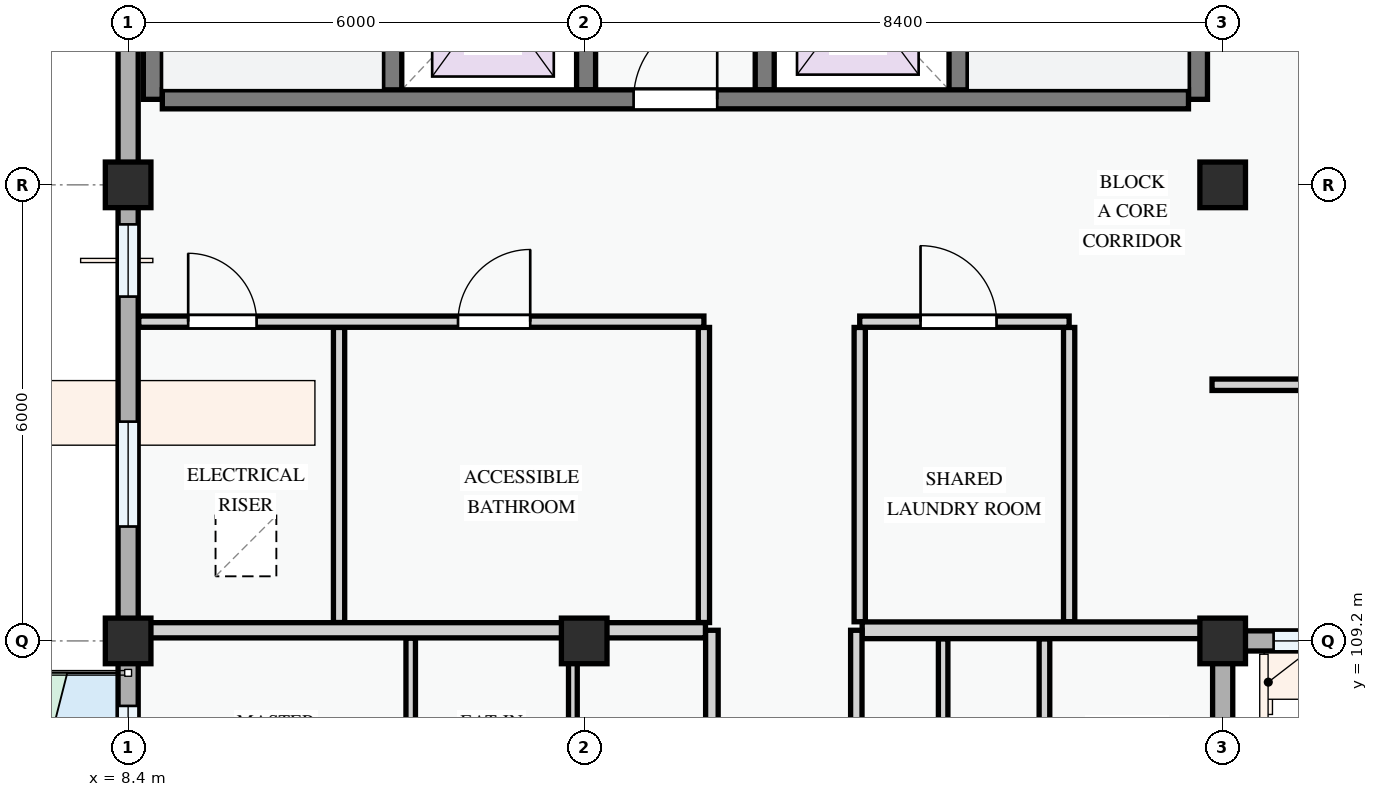
"""IFC4 building model, lengths in metres.
Left out: names, types, materials, properties, quantities, classifications, styles, units other than length and angle.
Written with IfcOpenShell. Run it as: python <this file> out.ifc"""

import sys

from ifc_helpers import new_model, si_unit, direction, frame, frame_2d, origin, origin_2d, place, context, subcontext, project, spatial, rectangle, extrude, element, fill, save


model = new_model("IFC4")
c1 = context("Model", 3, precision=1e-05, world=origin(), true_north=direction((0.0, 1.0)))
c2 = subcontext(c1, "Body", "Model", "MODEL_VIEW")
j1 = project(units=[si_unit("LENGTHUNIT", "METRE"), si_unit("PLANEANGLEUNIT", "RADIAN")], contexts=[c1])
p1 = place(None, origin())
s1 = spatial("IfcSite", under=j1, at=p1, CompositionType="ELEMENT")
p2 = place(p1, origin())
s2 = spatial("IfcBuilding", under=s1, at=p2, CompositionType="ELEMENT")
p3 = place(p2, frame((0.0, 0.0, 34.5)))
s3 = spatial("IfcBuildingStorey", under=s2, at=p3, CompositionType="ELEMENT", Elevation=34.5)
for number, where, z_axis, x_axis in (
    (1, (8.4, 109.2, 0.0), (0.0, 0.0, 1.0), (1.0, 0.0, 0.0)),
    (2, (8.4, 115.2, 0.0), (0.0, 0.0, 1.0), (1.0, 0.0, 0.0)),
    (3, (14.4, 109.2, 0.0), (0.0, 0.0, 1.0), (1.0, 0.0, 0.0)),
    (4, (22.8, 109.2, 0.0), (0.0, 0.0, 1.0), (1.0, 0.0, 0.0)),
    (5, (22.8, 115.2, 0.0), (0.0, 0.0, 1.0), (1.0, 0.0, 0.0)),
):
    element("IfcColumn", number, at=place(p3, frame(where, z_axis=z_axis, x_axis=x_axis)), inside=s3, PredefinedType="COLUMN", context=c2, shape_type="SweptSolid", body=[
        extrude(rectangle(XDim=0.6, YDim=0.6, at=origin_2d()), origin(), (0.0, 0.0, 1.0), 3.3),
    ])
p4 = place(p3, frame((22.8, 109.2, 0.0), z_axis=(0.0, 0.0, 1.0), x_axis=(1.0, 0.0, 0.0)))
e6 = element("IfcWall", 6, at=p4, inside=s3, PredefinedType="STANDARD", context=c2, shape_type="SweptSolid", body=[
    extrude(rectangle(XDim=6.0, YDim=0.265, at=frame_2d((3.0, 0.0))), origin(), (0.0, 0.0, 1.0), 2.525),
])
p5 = place(p4, frame((0.67, 0.0, 0.78)))
e7 = element("IfcOpeningElement", 7, at=p5, cuts=e6, PredefinedType="OPENING", context=c2, shape_type="SweptSolid", body=[
    extrude(rectangle(XDim=1.2, YDim=1.5, at=frame_2d((0.6, 0.75))), frame((0.0, 0.143, 0.0), z_axis=(0.0, -1.0, 0.0), x_axis=(1.0, 0.0, 0.0)), (0.0, 0.0, 1.0), 0.285),
])
p6 = place(p4, frame((3.22, 0.0, 0.78)))
e8 = element("IfcOpeningElement", 8, at=p6, cuts=e6, PredefinedType="OPENING", context=c2, shape_type="SweptSolid", body=[
    extrude(rectangle(XDim=1.72, YDim=1.52, at=frame_2d((0.86, 0.76))), frame((0.0, 0.143, 0.0), z_axis=(0.0, -1.0, 0.0), x_axis=(1.0, 0.0, 0.0)), (0.0, 0.0, 1.0), 0.285),
])
p7 = place(p3, frame((8.4, 123.6, 0.0), z_axis=(0.0, 0.0, 1.0), x_axis=(0.0, -1.0, 0.0)))
e9 = element("IfcWall", 9, at=p7, inside=s3, PredefinedType="STANDARD", context=c2, shape_type="SweptSolid", body=[
    extrude(rectangle(XDim=8.4, YDim=0.265, at=frame_2d((4.2, 0.0))), origin(), (0.0, 0.0, 1.0), 2.345),
])
p8 = place(p7, frame((1.086, 0.0, 0.78)))
e10 = element("IfcOpeningElement", 10, at=p8, cuts=e9, PredefinedType="OPENING", context=c2, shape_type="SweptSolid", body=[
    extrude(rectangle(XDim=1.82, YDim=1.46, at=frame_2d((0.91, 0.73))), frame((0.0, 0.143, 0.0), z_axis=(0.0, -1.0, 0.0), x_axis=(1.0, 0.0, 0.0)), (0.0, 0.0, 1.0), 0.285),
])
p9 = place(p7, frame((4.969, 0.0, 0.78)))
e11 = element("IfcOpeningElement", 11, at=p9, cuts=e9, PredefinedType="OPENING", context=c2, shape_type="SweptSolid", body=[
    extrude(rectangle(XDim=1.0, YDim=1.25, at=frame_2d((0.5, 0.625))), frame((0.0, 0.143, 0.0), z_axis=(0.0, -1.0, 0.0), x_axis=(1.0, 0.0, 0.0)), (0.0, 0.0, 1.0), 0.285),
])
p10 = place(p3, frame((8.4, 115.2, 0.0), z_axis=(0.0, 0.0, 1.0), x_axis=(0.0, -1.0, 0.0)))
e12 = element("IfcWall", 12, at=p10, inside=s3, PredefinedType="STANDARD", context=c2, shape_type="SweptSolid", body=[
    extrude(rectangle(XDim=6.0, YDim=0.265, at=frame_2d((3.0, 0.0))), origin(), (0.0, 0.0, 1.0), 2.445),
])
p11 = place(p10, frame((0.52, 0.0, 0.78)))
e13 = element("IfcOpeningElement", 13, at=p11, cuts=e12, PredefinedType="OPENING", context=c2, shape_type="SweptSolid", body=[
    extrude(rectangle(XDim=0.95, YDim=1.15, at=frame_2d((0.475, 0.575))), frame((0.0, 0.143, 0.0), z_axis=(0.0, -1.0, 0.0), x_axis=(1.0, 0.0, 0.0)), (0.0, 0.0, 1.0), 0.285),
])
p12 = place(p10, frame((3.115, 0.0, 0.78)))
e14 = element("IfcOpeningElement", 14, at=p12, cuts=e12, PredefinedType="OPENING", context=c2, shape_type="SweptSolid", body=[
    extrude(rectangle(XDim=1.38, YDim=1.48, at=frame_2d((0.69, 0.74))), frame((0.0, 0.143, 0.0), z_axis=(0.0, -1.0, 0.0), x_axis=(1.0, 0.0, 0.0)), (0.0, 0.0, 1.0), 0.285),
])
p13 = place(p3, frame((8.4, 109.2, 0.0), z_axis=(0.0, 0.0, 1.0), x_axis=(0.0, -1.0, 0.0)))
e15 = element("IfcWall", 15, at=p13, inside=s3, PredefinedType="STANDARD", context=c2, shape_type="SweptSolid", body=[
    extrude(rectangle(XDim=8.4, YDim=0.265, at=frame_2d((4.2, 0.0))), origin(), (0.0, 0.0, 1.0), 2.345),
])
p14 = place(p13, frame((3.6, 0.0, 0.0)))
e16 = element("IfcOpeningElement", 16, at=p14, cuts=e15, PredefinedType="OPENING", context=c2, shape_type="SweptSolid", body=[
    extrude(rectangle(XDim=1.2, YDim=2.15, at=frame_2d((0.6, 1.075))), frame((0.0, 0.143, 0.0), z_axis=(0.0, -1.0, 0.0), x_axis=(1.0, 0.0, 0.0)), (0.0, 0.0, 1.0), 0.285),
])
p15 = place(p13, frame((0.855, 0.0, 0.78)))
e17 = element("IfcOpeningElement", 17, at=p15, cuts=e15, PredefinedType="OPENING", context=c2, shape_type="SweptSolid", body=[
    extrude(rectangle(XDim=1.75, YDim=1.45, at=frame_2d((0.875, 0.725))), frame((0.0, 0.143, 0.0), z_axis=(0.0, -1.0, 0.0), x_axis=(1.0, 0.0, 0.0)), (0.0, 0.0, 1.0), 0.285),
])
p16 = place(p13, frame((5.14, 0.0, 0.78)))
e18 = element("IfcOpeningElement", 18, at=p16, cuts=e15, PredefinedType="OPENING", context=c2, shape_type="SweptSolid", body=[
    extrude(rectangle(XDim=1.25, YDim=1.45, at=frame_2d((0.625, 0.725))), frame((0.0, 0.143, 0.0), z_axis=(0.0, -1.0, 0.0), x_axis=(1.0, 0.0, 0.0)), (0.0, 0.0, 1.0), 0.285),
])
p17 = place(p13, frame((6.995, 0.0, 0.78)))
e19 = element("IfcOpeningElement", 19, at=p17, cuts=e15, PredefinedType="OPENING", context=c2, shape_type="SweptSolid", body=[
    extrude(rectangle(XDim=0.9, YDim=1.2, at=frame_2d((0.45, 0.6))), frame((0.0, 0.143, 0.0), z_axis=(0.0, -1.0, 0.0), x_axis=(1.0, 0.0, 0.0)), (0.0, 0.0, 1.0), 0.285),
])
p18 = place(p3, frame((22.8, 100.8, 0.0), z_axis=(0.0, 0.0, 1.0), x_axis=(0.0, 1.0, 0.0)))
e20 = element("IfcWall", 20, at=p18, inside=s3, PredefinedType="STANDARD", context=c2, shape_type="SweptSolid", body=[
    extrude(rectangle(XDim=8.4, YDim=0.265, at=frame_2d((4.2, 0.0))), origin(), (0.0, 0.0, 1.0), 2.425),
])
p19 = place(p18, frame((0.505, 0.0, 0.78)))
e21 = element("IfcOpeningElement", 21, at=p19, cuts=e20, PredefinedType="OPENING", context=c2, shape_type="SweptSolid", body=[
    extrude(rectangle(XDim=0.9, YDim=1.2, at=frame_2d((0.45, 0.6))), frame((0.0, 0.143, 0.0), z_axis=(0.0, -1.0, 0.0), x_axis=(1.0, 0.0, 0.0)), (0.0, 0.0, 1.0), 0.285),
])
p20 = place(p18, frame((2.257, 0.0, 0.78)))
e22 = element("IfcOpeningElement", 22, at=p20, cuts=e20, PredefinedType="OPENING", context=c2, shape_type="SweptSolid", body=[
    extrude(rectangle(XDim=2.2, YDim=1.5, at=frame_2d((1.1, 0.75))), frame((0.0, 0.143, 0.0), z_axis=(0.0, -1.0, 0.0), x_axis=(1.0, 0.0, 0.0)), (0.0, 0.0, 1.0), 0.285),
])
p21 = place(p18, frame((5.977, 0.0, 0.78)))
e23 = element("IfcOpeningElement", 23, at=p21, cuts=e20, PredefinedType="OPENING", context=c2, shape_type="SweptSolid", body=[
    extrude(rectangle(XDim=1.25, YDim=1.45, at=frame_2d((0.625, 0.725))), frame((0.0, 0.143, 0.0), z_axis=(0.0, -1.0, 0.0), x_axis=(1.0, 0.0, 0.0)), (0.0, 0.0, 1.0), 0.285),
])
p22 = place(p3, frame((11.875, 123.25, 0.0), z_axis=(0.0, 0.0, 1.0), x_axis=(0.0, -1.0, 0.0)))
e24 = element("IfcWall", 24, at=p22, inside=s3, PredefinedType="SHEAR", context=c2, shape_type="SweptSolid", body=[
    extrude(rectangle(XDim=6.925, YDim=0.25, at=frame_2d((3.462, 0.0))), origin(), (0.0, 0.0, 1.0), 3.0),
])
p23 = place(p22, frame((0.35, 0.0, 0.0)))
e25 = element("IfcOpeningElement", 25, at=p23, cuts=e24, PredefinedType="OPENING", context=c2, shape_type="SweptSolid", body=[
    extrude(rectangle(XDim=0.95, YDim=2.1, at=frame_2d((0.475, 1.05))), frame((0.0, 0.135, 0.0), z_axis=(0.0, -1.0, 0.0), x_axis=(1.0, 0.0, 0.0)), (0.0, 0.0, 1.0), 0.27),
])
p24 = place(p3, frame((8.725, 123.4, 0.0), z_axis=(0.0, 0.0, 1.0), x_axis=(0.0, -1.0, 0.0)))
e26 = element("IfcWall", 26, at=p24, inside=s3, PredefinedType="SHEAR", context=c2, shape_type="SweptSolid", body=[
    extrude(rectangle(XDim=7.075, YDim=0.25, at=frame_2d((3.538, 0.0))), origin(), (0.0, 0.0, 1.0), 3.0),
])
p25 = place(p3, frame((22.475, 123.25, 0.0), z_axis=(0.0, 0.0, 1.0), x_axis=(0.0, -1.0, 0.0)))
e27 = element("IfcWall", 27, at=p25, inside=s3, PredefinedType="SHEAR", context=c2, shape_type="SweptSolid", body=[
    extrude(rectangle(XDim=6.925, YDim=0.25, at=frame_2d((3.462, 0.0))), origin(), (0.0, 0.0, 1.0), 3.0),
])
p26 = place(p3, frame((19.325, 123.25, 0.0), z_axis=(0.0, 0.0, 1.0), x_axis=(0.0, -1.0, 0.0)))
e28 = element("IfcWall", 28, at=p26, inside=s3, PredefinedType="SHEAR", context=c2, shape_type="SweptSolid", body=[
    extrude(rectangle(XDim=6.925, YDim=0.25, at=frame_2d((3.462, 0.0))), origin(), (0.0, 0.0, 1.0), 3.0),
])
p27 = place(p26, frame((0.35, 0.0, 0.0)))
e29 = element("IfcOpeningElement", 29, at=p27, cuts=e28, PredefinedType="OPENING", context=c2, shape_type="SweptSolid", body=[
    extrude(rectangle(XDim=0.95, YDim=2.1, at=frame_2d((0.475, 1.05))), frame((0.0, 0.135, 0.0), z_axis=(0.0, -1.0, 0.0), x_axis=(1.0, 0.0, 0.0)), (0.0, 0.0, 1.0), 0.27),
])
for number, where, z_axis, x_axis in (
    (30, (14.425, 118.875, 0.0), (0.0, 0.0, 1.0), (0.0, -1.0, 0.0)),
    (31, (16.775, 118.875, 0.0), (0.0, 0.0, 1.0), (0.0, -1.0, 0.0)),
):
    element("IfcWall", number, at=place(p3, frame(where, z_axis=z_axis, x_axis=x_axis)), inside=s3, PredefinedType="SHEAR", context=c2, shape_type="SweptSolid", body=[
        extrude(rectangle(XDim=2.425, YDim=0.25, at=frame_2d((1.212, 0.0))), origin(), (0.0, 0.0, 1.0), 3.0),
    ])
p28 = place(p3, frame((8.85, 116.325, 0.0), z_axis=(0.0, 0.0, 1.0), x_axis=(1.0, 0.0, 0.0)))
e32 = element("IfcWall", 32, at=p28, inside=s3, PredefinedType="SHEAR", context=c2, shape_type="SweptSolid", body=[
    extrude(rectangle(XDim=13.5, YDim=0.25, at=frame_2d((6.75, 0.0))), origin(), (0.0, 0.0, 1.0), 3.0),
])
p29 = place(p28, frame((6.2, 0.0, 0.0)))
e33 = element("IfcOpeningElement", 33, at=p29, cuts=e32, PredefinedType="OPENING", context=c2, shape_type="SweptSolid", body=[
    extrude(rectangle(XDim=1.1, YDim=2.15, at=frame_2d((0.55, 1.075))), frame((0.0, 0.135, 0.0), z_axis=(0.0, -1.0, 0.0), x_axis=(1.0, 0.0, 0.0)), (0.0, 0.0, 1.0), 0.27),
])
for number, where, z_axis, x_axis in (
    (34, (11.175, 113.324, 0.0), (0.0, 0.0, 1.0), (0.0, -1.0, 0.0)),
    (35, (15.975, 113.324, 0.0), (0.0, 0.0, 1.0), (0.0, -1.0, 0.0)),
):
    element("IfcWall", number, at=place(p3, frame(where, z_axis=z_axis, x_axis=x_axis)), inside=s3, PredefinedType="PARTITIONING", context=c2, shape_type="SweptSolid", body=[
        extrude(rectangle(XDim=3.882, YDim=0.148, at=frame_2d((1.941, 0.0))), origin(), (0.0, 0.0, 1.0), 3.0),
    ])
for number, where, z_axis, x_axis in (
    (36, (18.025, 113.324, 0.0), (0.0, 0.0, 1.0), (0.0, -1.0, 0.0)),
    (37, (20.78, 113.324, 0.0), (0.0, 0.0, 1.0), (0.0, -1.0, 0.0)),
):
    element("IfcWall", number, at=place(p3, frame(where, z_axis=z_axis, x_axis=x_axis)), inside=s3, PredefinedType="PARTITIONING", context=c2, shape_type="SweptSolid", body=[
        extrude(rectangle(XDim=3.872, YDim=0.148, at=frame_2d((1.936, 0.0))), origin(), (0.0, 0.0, 1.0), 3.0),
    ])
p30 = place(p3, frame((8.54, 113.4, 0.0), z_axis=(0.0, 0.0, 1.0), x_axis=(1.0, 0.0, 0.0)))
e38 = element("IfcWall", 38, at=p30, inside=s3, PredefinedType="PARTITIONING", context=c2, shape_type="SweptSolid", body=[
    extrude(rectangle(XDim=7.435, YDim=0.148, at=frame_2d((3.718, 0.0))), origin(), (0.0, 0.0, 1.0), 3.0),
])
p31 = place(p30, frame((0.65, 0.0, 0.0)))
e39 = element("IfcOpeningElement", 39, at=p31, cuts=e38, PredefinedType="OPENING", context=c2, shape_type="SweptSolid", body=[
    extrude(rectangle(XDim=0.9, YDim=2.1, at=frame_2d((0.45, 1.05))), frame((0.0, 0.084, 0.0), z_axis=(0.0, -1.0, 0.0), x_axis=(1.0, 0.0, 0.0)), (0.0, 0.0, 1.0), 0.168),
])
p32 = place(p30, frame((4.2, 0.0, 0.0)))
e40 = element("IfcOpeningElement", 40, at=p32, cuts=e38, PredefinedType="OPENING", context=c2, shape_type="SweptSolid", body=[
    extrude(rectangle(XDim=0.95, YDim=2.1, at=frame_2d((0.475, 1.05))), frame((0.0, 0.084, 0.0), z_axis=(0.0, -1.0, 0.0), x_axis=(1.0, 0.0, 0.0)), (0.0, 0.0, 1.0), 0.168),
])
p33 = place(p3, frame((18.025, 113.4, 0.0), z_axis=(0.0, 0.0, 1.0), x_axis=(1.0, 0.0, 0.0)))
e41 = element("IfcWall", 41, at=p33, inside=s3, PredefinedType="PARTITIONING", context=c2, shape_type="SweptSolid", body=[
    extrude(rectangle(XDim=2.755, YDim=0.148, at=frame_2d((1.377, 0.0))), origin(), (0.0, 0.0, 1.0), 3.0),
])
p34 = place(p33, frame((0.8, 0.0, 0.0)))
e42 = element("IfcOpeningElement", 42, at=p34, cuts=e41, PredefinedType="OPENING", context=c2, shape_type="SweptSolid", body=[
    extrude(rectangle(XDim=1.0, YDim=2.15, at=frame_2d((0.5, 1.075))), frame((0.0, 0.084, 0.0), z_axis=(0.0, -1.0, 0.0), x_axis=(1.0, 0.0, 0.0)), (0.0, 0.0, 1.0), 0.168),
])
p35 = place(p3, frame((22.66, 112.57, 0.0), z_axis=(0.0, 0.0, 1.0), x_axis=(1.0, 0.0, 0.0)))
e43 = element("IfcWall", 43, at=p35, inside=s3, PredefinedType="PARTITIONING", context=c2, shape_type="SweptSolid", body=[
    extrude(rectangle(XDim=2.406, YDim=0.15, at=frame_2d((1.203, 0.0))), origin(), (0.0, 0.0, 1.0), 3.0),
])
p36 = place(p3, frame((12.118, 106.002, 0.0), z_axis=(0.0, 0.0, 1.0), x_axis=(0.0, 1.0, 0.0)))
e44 = element("IfcWall", 44, at=p36, inside=s3, PredefinedType="PARTITIONING", context=c2, shape_type="SweptSolid", body=[
    extrude(rectangle(XDim=3.236, YDim=0.125, at=frame_2d((1.618, 0.0))), origin(), (0.0, 0.0, 1.0), 3.0),
])
p37 = place(p3, frame((14.251, 106.002, 0.0), z_axis=(0.0, 0.0, 1.0), x_axis=(0.0, 1.0, 0.0)))
e45 = element("IfcWall", 45, at=p37, inside=s3, PredefinedType="PARTITIONING", context=c2, shape_type="SweptSolid", body=[
    extrude(rectangle(XDim=3.236, YDim=0.115, at=frame_2d((1.618, 0.0))), origin(), (0.0, 0.0, 1.0), 2.425),
])
p38 = place(p3, frame((20.455, 105.846, 0.0), z_axis=(0.0, 0.0, 1.0), x_axis=(0.0, 1.0, 0.0)))
e46 = element("IfcWall", 46, at=p38, inside=s3, PredefinedType="PARTITIONING", context=c2, shape_type="SweptSolid", body=[
    extrude(rectangle(XDim=3.382, YDim=0.14, at=frame_2d((1.691, 0.0))), origin(), (0.0, 0.0, 1.0), 3.0),
])
p39 = place(p3, frame((19.122, 105.846, 0.0), z_axis=(0.0, 0.0, 1.0), x_axis=(0.0, 1.0, 0.0)))
e47 = element("IfcWall", 47, at=p39, inside=s3, PredefinedType="PARTITIONING", context=c2, shape_type="SweptSolid", body=[
    extrude(rectangle(XDim=3.382, YDim=0.125, at=frame_2d((1.691, 0.0))), origin(), (0.0, 0.0, 1.0), 3.0),
])
p40 = place(p3, frame((8.534, 109.34, 0.0), z_axis=(0.0, 0.0, 1.0), x_axis=(1.0, 0.0, 0.0)))
e48 = element("IfcWall", 48, at=p40, inside=s3, PredefinedType="PARTITIONING", context=c2, shape_type="SweptSolid", body=[
    extrude(rectangle(XDim=7.461, YDim=0.2, at=frame_2d((3.73, 0.0))), origin(), (0.0, 0.0, 1.0), 2.375),
])
p41 = place(p3, frame((18.057, 109.34, 0.0), z_axis=(0.0, 0.0, 1.0), x_axis=(1.0, 0.0, 0.0)))
e49 = element("IfcWall", 49, at=p41, inside=s3, PredefinedType="PARTITIONING", context=c2, shape_type="SweptSolid", body=[
    extrude(rectangle(XDim=4.683, YDim=0.22, at=frame_2d((2.342, 0.0))), origin(), (0.0, 0.0, 1.0), 2.375),
])
p42 = place(p3, frame((16.08, 86.534, 0.0), z_axis=(0.0, 0.0, 1.0), x_axis=(0.0, 1.0, 0.0)))
e50 = element("IfcWall", 50, at=p42, inside=s3, PredefinedType="PARTITIONING", context=c2, shape_type="SweptSolid", body=[
    extrude(rectangle(XDim=22.806, YDim=0.165, at=frame_2d((11.403, 0.0))), origin(), (0.0, 0.0, 1.0), 3.0),
])
p43 = place(p42, frame((2.006, 0.0, 0.0)))
e51 = element("IfcOpeningElement", 51, at=p43, cuts=e50, PredefinedType="OPENING", context=c2, shape_type="SweptSolid", body=[
    extrude(rectangle(XDim=0.96, YDim=2.12, at=frame_2d((0.48, 1.06))), frame((0.0, 0.093, 0.0), z_axis=(0.0, -1.0, 0.0), x_axis=(1.0, 0.0, 0.0)), (0.0, 0.0, 1.0), 0.185),
])
p44 = place(p42, frame((10.035, 0.0, 0.0)))
e52 = element("IfcOpeningElement", 52, at=p44, cuts=e50, PredefinedType="OPENING", context=c2, shape_type="SweptSolid", body=[
    extrude(rectangle(XDim=0.92, YDim=2.1, at=frame_2d((0.46, 1.05))), frame((0.0, 0.093, 0.0), z_axis=(0.0, -1.0, 0.0), x_axis=(1.0, 0.0, 0.0)), (0.0, 0.0, 1.0), 0.185),
])
p45 = place(p42, frame((18.003, 0.0, 0.0)))
e53 = element("IfcOpeningElement", 53, at=p45, cuts=e50, PredefinedType="OPENING", context=c2, shape_type="SweptSolid", body=[
    extrude(rectangle(XDim=0.92, YDim=2.1, at=frame_2d((0.46, 1.05))), frame((0.0, 0.093, 0.0), z_axis=(0.0, -1.0, 0.0), x_axis=(1.0, 0.0, 0.0)), (0.0, 0.0, 1.0), 0.185),
])
p46 = place(p3, frame((17.98, 86.534, 0.0), z_axis=(0.0, 0.0, 1.0), x_axis=(0.0, 1.0, 0.0)))
e54 = element("IfcWall", 54, at=p46, inside=s3, PredefinedType="PARTITIONING", context=c2, shape_type="SweptSolid", body=[
    extrude(rectangle(XDim=22.806, YDim=0.15, at=frame_2d((11.403, 0.0))), origin(), (0.0, 0.0, 1.0), 3.0),
])
p47 = place(p46, frame((1.874, 0.0, 0.0)))
e55 = element("IfcOpeningElement", 55, at=p47, cuts=e54, PredefinedType="OPENING", context=c2, shape_type="SweptSolid", body=[
    extrude(rectangle(XDim=0.92, YDim=2.1, at=frame_2d((0.46, 1.05))), frame((0.0, 0.085, 0.0), z_axis=(0.0, -1.0, 0.0), x_axis=(1.0, 0.0, 0.0)), (0.0, 0.0, 1.0), 0.17),
])
p48 = place(p46, frame((9.846, 0.0, 0.0)))
e56 = element("IfcOpeningElement", 56, at=p48, cuts=e54, PredefinedType="OPENING", context=c2, shape_type="SweptSolid", body=[
    extrude(rectangle(XDim=0.92, YDim=2.1, at=frame_2d((0.46, 1.05))), frame((0.0, 0.085, 0.0), z_axis=(0.0, -1.0, 0.0), x_axis=(1.0, 0.0, 0.0)), (0.0, 0.0, 1.0), 0.17),
])
p49 = place(p46, frame((17.992, 0.0, 0.0)))
e57 = element("IfcOpeningElement", 57, at=p49, cuts=e54, PredefinedType="OPENING", context=c2, shape_type="SweptSolid", body=[
    extrude(rectangle(XDim=0.96, YDim=2.12, at=frame_2d((0.48, 1.06))), frame((0.0, 0.085, 0.0), z_axis=(0.0, -1.0, 0.0), x_axis=(1.0, 0.0, 0.0)), (0.0, 0.0, 1.0), 0.17),
])
p50 = place(p5, origin())
e58 = element("IfcWindow", 58, at=p50, inside=s3, PartitioningType="SINGLE_PANEL", PredefinedType="WINDOW", context=c2, shape_type="SweptSolid", body=[
    extrude(rectangle(XDim=1.2, YDim=1.5, at=frame_2d((0.6, 0.75))), frame((0.0, 0.03, 0.0), z_axis=(0.0, -1.0, 0.0), x_axis=(1.0, 0.0, 0.0)), (0.0, 0.0, 1.0), 0.06),
])
fill(e7, e58)
p51 = place(p11, origin())
e59 = element("IfcWindow", 59, at=p51, inside=s3, PartitioningType="SINGLE_PANEL", PredefinedType="WINDOW", context=c2, shape_type="SweptSolid", body=[
    extrude(rectangle(XDim=0.95, YDim=1.15, at=frame_2d((0.475, 0.575))), frame((0.0, 0.03, 0.0), z_axis=(0.0, -1.0, 0.0), x_axis=(1.0, 0.0, 0.0)), (0.0, 0.0, 1.0), 0.06),
])
fill(e13, e59)
p52 = place(p12, origin())
e60 = element("IfcWindow", 60, at=p52, inside=s3, PartitioningType="SINGLE_PANEL", PredefinedType="WINDOW", context=c2, shape_type="SweptSolid", body=[
    extrude(rectangle(XDim=1.38, YDim=1.48, at=frame_2d((0.69, 0.74))), frame((0.0, 0.03, 0.0), z_axis=(0.0, -1.0, 0.0), x_axis=(1.0, 0.0, 0.0)), (0.0, 0.0, 1.0), 0.06),
])
fill(e14, e60)
p53 = place(p15, origin())
e61 = element("IfcWindow", 61, at=p53, inside=s3, PartitioningType="DOUBLE_PANEL_VERTICAL", PredefinedType="WINDOW", context=c2, shape_type="SweptSolid", body=[
    extrude(rectangle(XDim=1.75, YDim=1.45, at=frame_2d((0.875, 0.725))), frame((0.0, 0.03, 0.0), z_axis=(0.0, -1.0, 0.0), x_axis=(1.0, 0.0, 0.0)), (0.0, 0.0, 1.0), 0.06),
])
fill(e17, e61)
p54 = place(p29, origin())
e62 = element("IfcDoor", 62, at=p54, inside=s3, OperationType="SINGLE_SWING_RIGHT", PredefinedType="DOOR", context=c2, shape_type="SweptSolid", body=[
    extrude(rectangle(XDim=1.1, YDim=2.15, at=frame_2d((0.55, 1.075))), frame((0.0, 0.025, 0.0), z_axis=(0.0, -1.0, 0.0), x_axis=(1.0, 0.0, 0.0)), (0.0, 0.0, 1.0), 0.05),
])
fill(e33, e62)
p55 = place(p31, origin())
e63 = element("IfcDoor", 63, at=p55, inside=s3, OperationType="SINGLE_SWING_LEFT", PredefinedType="DOOR", context=c2, shape_type="SweptSolid", body=[
    extrude(rectangle(XDim=0.9, YDim=2.1, at=frame_2d((0.45, 1.05))), frame((0.0, 0.025, 0.0), z_axis=(0.0, -1.0, 0.0), x_axis=(1.0, 0.0, 0.0)), (0.0, 0.0, 1.0), 0.05),
])
fill(e39, e63)
p56 = place(p32, origin())
e64 = element("IfcDoor", 64, at=p56, inside=s3, OperationType="SINGLE_SWING_RIGHT", PredefinedType="DOOR", context=c2, shape_type="SweptSolid", body=[
    extrude(rectangle(XDim=0.95, YDim=2.1, at=frame_2d((0.475, 1.05))), frame((0.0, 0.025, 0.0), z_axis=(0.0, -1.0, 0.0), x_axis=(1.0, 0.0, 0.0)), (0.0, 0.0, 1.0), 0.05),
])
fill(e40, e64)
p57 = place(p34, origin())
e65 = element("IfcDoor", 65, at=p57, inside=s3, OperationType="SINGLE_SWING_LEFT", PredefinedType="DOOR", context=c2, shape_type="SweptSolid", body=[
    extrude(rectangle(XDim=1.0, YDim=2.15, at=frame_2d((0.5, 1.075))), frame((0.0, 0.025, 0.0), z_axis=(0.0, -1.0, 0.0), x_axis=(1.0, 0.0, 0.0)), (0.0, 0.0, 1.0), 0.05),
])
fill(e42, e65)
save(model, sys.argv[1])
